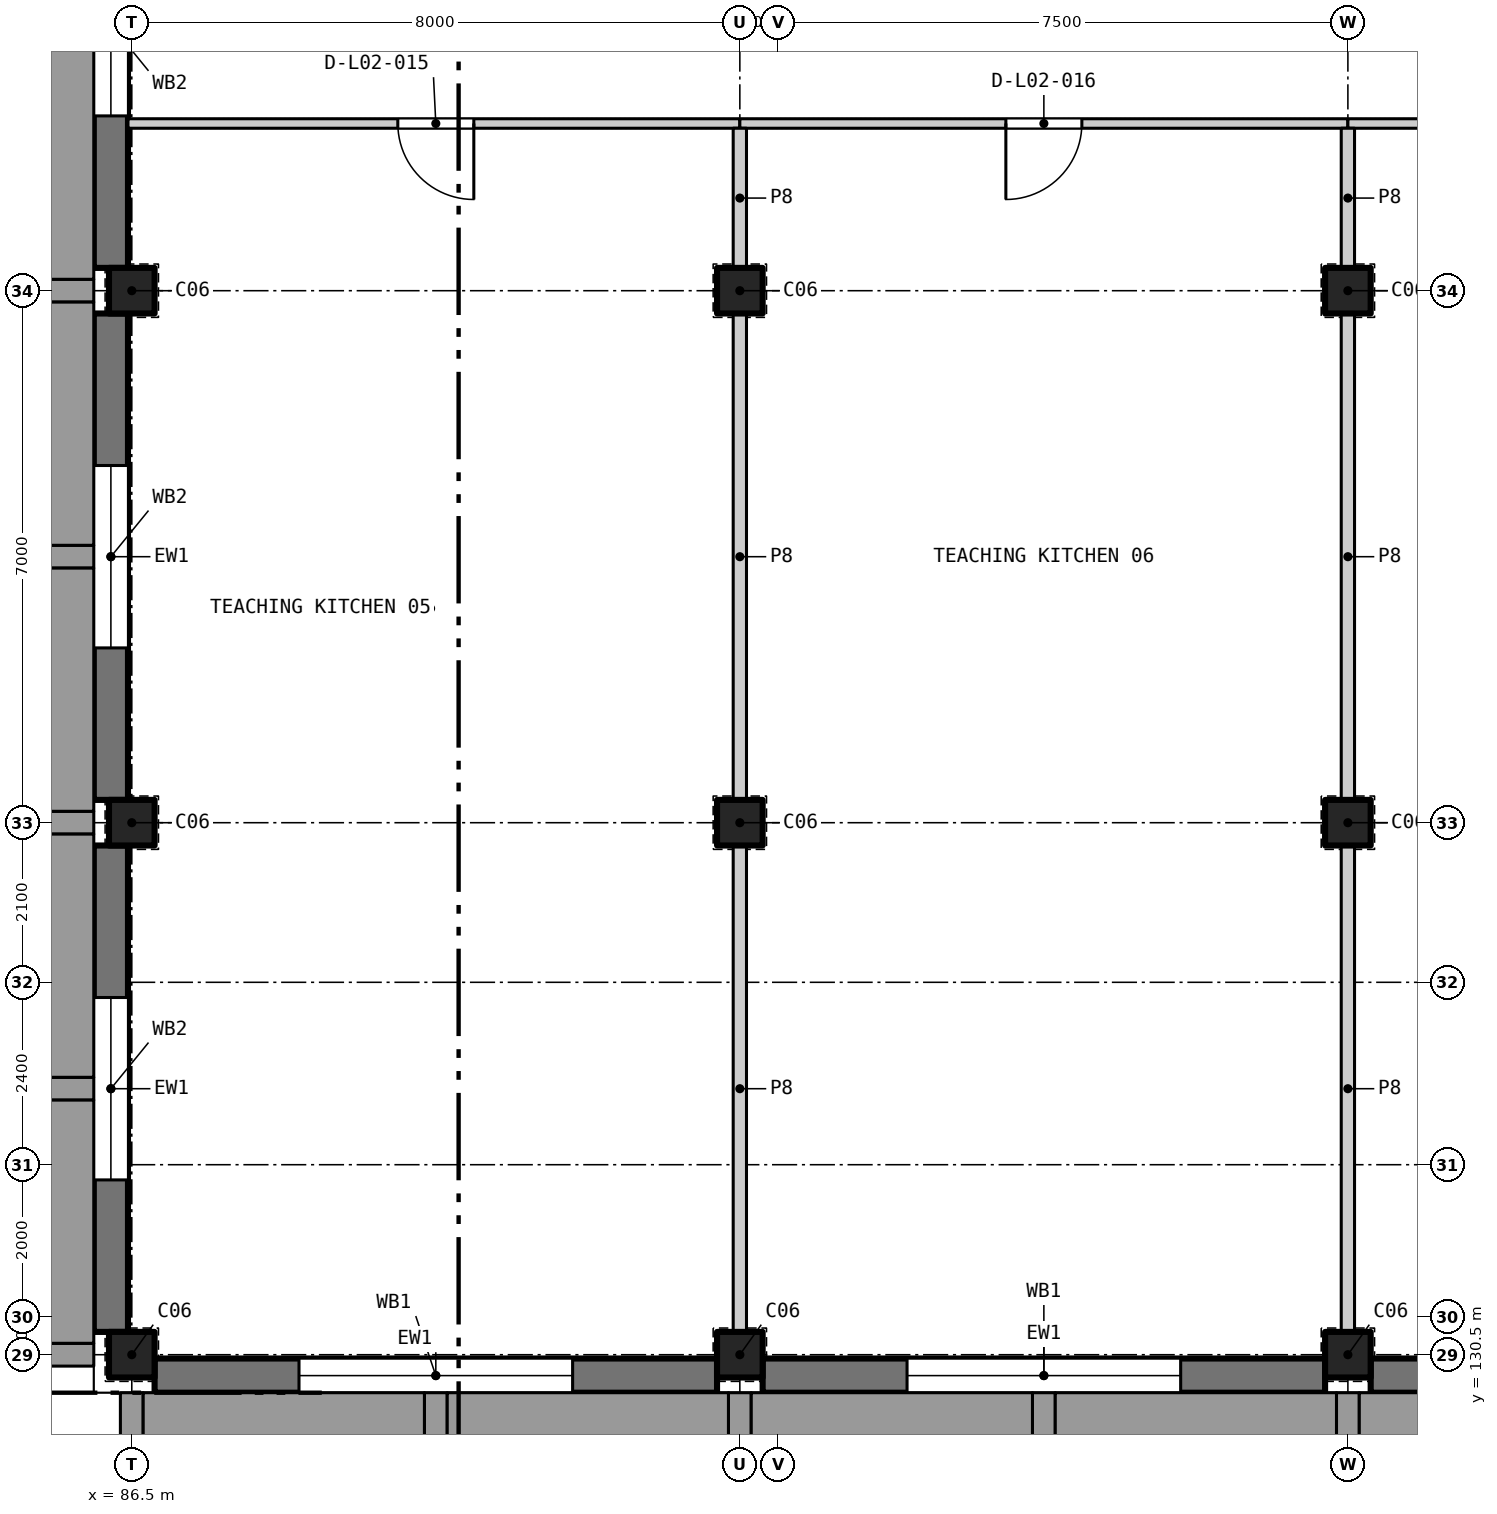
"""IFC4 building model, lengths in metres.
Left out: names, types, materials, properties, quantities, classifications, styles, units other than length and angle.
Written with IfcOpenShell. Run it as: python <this file> out.ifc"""

import sys

from ifc_helpers import new_model, si_unit, direction, frame, frame_2d, origin, origin_2d, place, context, subcontext, project, spatial, rectangle, extrude, element, fill, save


model = new_model("IFC4")
c1 = context("Model", 3, precision=1e-05, world=origin(), true_north=direction((0.0, 1.0)))
c2 = subcontext(c1, "Body", "Model", "MODEL_VIEW")
j1 = project(units=[si_unit("LENGTHUNIT", "METRE"), si_unit("PLANEANGLEUNIT", "RADIAN")], contexts=[c1])
p1 = place(None, origin())
s1 = spatial("IfcSite", under=j1, at=p1, CompositionType="ELEMENT")
p2 = place(p1, origin())
s2 = spatial("IfcBuilding", under=s1, at=p2, CompositionType="ELEMENT")
p3 = place(p2, frame((0.0, 0.0, 10.2)))
s3 = spatial("IfcBuildingStorey", under=s2, at=p3, CompositionType="ELEMENT", Elevation=10.2)
for number, where, z_axis, x_axis in (
    (1, (86.5, 130.5, 0.0), (0.0, 0.0, 1.0), (1.0, 0.0, 0.0)),
    (2, (86.5, 137.5, 0.0), (0.0, 0.0, 1.0), (1.0, 0.0, 0.0)),
    (3, (86.5, 144.5, 0.0), (0.0, 0.0, 1.0), (1.0, 0.0, 0.0)),
    (4, (94.5, 130.5, 0.0), (0.0, 0.0, 1.0), (1.0, 0.0, 0.0)),
    (5, (94.5, 137.5, 0.0), (0.0, 0.0, 1.0), (1.0, 0.0, 0.0)),
    (6, (94.5, 144.5, 0.0), (0.0, 0.0, 1.0), (1.0, 0.0, 0.0)),
    (7, (102.5, 130.5, 0.0), (0.0, 0.0, 1.0), (1.0, 0.0, 0.0)),
    (8, (102.5, 137.5, 0.0), (0.0, 0.0, 1.0), (1.0, 0.0, 0.0)),
    (9, (102.5, 144.5, 0.0), (0.0, 0.0, 1.0), (1.0, 0.0, 0.0)),
):
    element("IfcColumn", number, at=place(p3, frame(where, z_axis=z_axis, x_axis=x_axis)), inside=s3, PredefinedType="COLUMN", context=c2, shape_type="SweptSolid", body=[
        extrude(rectangle(XDim=0.6, YDim=0.6, at=origin_2d()), origin(), (0.0, 0.0, 1.0), 4.2),
    ])
p4 = place(p3, frame((94.2, 130.225, 0.0), z_axis=(0.0, 0.0, 1.0), x_axis=(-1.0, 0.0, 0.0)))
e10 = element("IfcWall", 10, at=p4, inside=s3, PredefinedType="SOLIDWALL", context=c2, shape_type="SweptSolid", body=[
    extrude(rectangle(XDim=7.4, YDim=0.45, at=frame_2d((3.7, 0.0))), origin(), (0.0, 0.0, 1.0), 3.1),
])
p5 = place(p4, frame((1.9, 0.0, 0.9)))
e11 = element("IfcOpeningElement", 11, at=p5, cuts=e10, PredefinedType="OPENING", context=c2, shape_type="SweptSolid", body=[
    extrude(rectangle(XDim=3.6, YDim=1.6, at=frame_2d((1.8, 0.8))), frame((0.0, 0.235, 0.0), z_axis=(0.0, -1.0, 0.0), x_axis=(1.0, 0.0, 0.0)), (0.0, 0.0, 1.0), 0.47),
])
p6 = place(p3, frame((102.2, 130.225, 0.0), z_axis=(0.0, 0.0, 1.0), x_axis=(-1.0, 0.0, 0.0)))
e12 = element("IfcWall", 12, at=p6, inside=s3, PredefinedType="SOLIDWALL", context=c2, shape_type="SweptSolid", body=[
    extrude(rectangle(XDim=7.4, YDim=0.45, at=frame_2d((3.7, 0.0))), origin(), (0.0, 0.0, 1.0), 3.1),
])
p7 = place(p6, frame((1.9, 0.0, 0.9)))
e13 = element("IfcOpeningElement", 13, at=p7, cuts=e12, PredefinedType="OPENING", context=c2, shape_type="SweptSolid", body=[
    extrude(rectangle(XDim=3.6, YDim=1.6, at=frame_2d((1.8, 0.8))), frame((0.0, 0.235, 0.0), z_axis=(0.0, -1.0, 0.0), x_axis=(1.0, 0.0, 0.0)), (0.0, 0.0, 1.0), 0.47),
])
p8 = place(p3, frame((110.2, 130.225, 0.0), z_axis=(0.0, 0.0, 1.0), x_axis=(-1.0, 0.0, 0.0)))
e14 = element("IfcWall", 14, at=p8, inside=s3, PredefinedType="SOLIDWALL", context=c2, shape_type="SweptSolid", body=[
    extrude(rectangle(XDim=7.4, YDim=0.45, at=frame_2d((3.7, 0.0))), origin(), (0.0, 0.0, 1.0), 3.1),
])
p9 = place(p8, frame((1.9, 0.0, 0.9)))
e15 = element("IfcOpeningElement", 15, at=p9, cuts=e14, PredefinedType="OPENING", context=c2, shape_type="SweptSolid", body=[
    extrude(rectangle(XDim=3.6, YDim=1.6, at=frame_2d((1.8, 0.8))), frame((0.0, 0.235, 0.0), z_axis=(0.0, -1.0, 0.0), x_axis=(1.0, 0.0, 0.0)), (0.0, 0.0, 1.0), 0.47),
])
p10 = place(p3, frame((86.225, 130.8, 0.0), z_axis=(0.0, 0.0, 1.0), x_axis=(0.0, 1.0, 0.0)))
e16 = element("IfcWall", 16, at=p10, inside=s3, PredefinedType="SOLIDWALL", context=c2, shape_type="SweptSolid", body=[
    extrude(rectangle(XDim=6.4, YDim=0.45, at=frame_2d((3.2, 0.0))), origin(), (0.0, 0.0, 1.0), 3.2),
])
p11 = place(p10, frame((2.0, 0.0, 0.9)))
e17 = element("IfcOpeningElement", 17, at=p11, cuts=e16, PredefinedType="OPENING", context=c2, shape_type="SweptSolid", body=[
    extrude(rectangle(XDim=2.4, YDim=1.6, at=frame_2d((1.2, 0.8))), frame((0.0, 0.235, 0.0), z_axis=(0.0, -1.0, 0.0), x_axis=(1.0, 0.0, 0.0)), (0.0, 0.0, 1.0), 0.47),
])
p12 = place(p3, frame((86.225, 137.8, 0.0), z_axis=(0.0, 0.0, 1.0), x_axis=(0.0, 1.0, 0.0)))
e18 = element("IfcWall", 18, at=p12, inside=s3, PredefinedType="SOLIDWALL", context=c2, shape_type="SweptSolid", body=[
    extrude(rectangle(XDim=6.4, YDim=0.45, at=frame_2d((3.2, 0.0))), origin(), (0.0, 0.0, 1.0), 3.2),
])
p13 = place(p12, frame((2.0, 0.0, 0.9)))
e19 = element("IfcOpeningElement", 19, at=p13, cuts=e18, PredefinedType="OPENING", context=c2, shape_type="SweptSolid", body=[
    extrude(rectangle(XDim=2.4, YDim=1.6, at=frame_2d((1.2, 0.8))), frame((0.0, 0.235, 0.0), z_axis=(0.0, -1.0, 0.0), x_axis=(1.0, 0.0, 0.0)), (0.0, 0.0, 1.0), 0.47),
])
p14 = place(p3, frame((86.225, 144.8, 0.0), z_axis=(0.0, 0.0, 1.0), x_axis=(0.0, 1.0, 0.0)))
e20 = element("IfcWall", 20, at=p14, inside=s3, PredefinedType="SOLIDWALL", context=c2, shape_type="SweptSolid", body=[
    extrude(rectangle(XDim=6.4, YDim=0.45, at=frame_2d((3.2, 0.0))), origin(), (0.0, 0.0, 1.0), 3.2),
])
p15 = place(p14, frame((2.0, 0.0, 0.9)))
e21 = element("IfcOpeningElement", 21, at=p15, cuts=e20, PredefinedType="OPENING", context=c2, shape_type="SweptSolid", body=[
    extrude(rectangle(XDim=2.4, YDim=1.6, at=frame_2d((1.2, 0.8))), frame((0.0, 0.235, 0.0), z_axis=(0.0, -1.0, 0.0), x_axis=(1.0, 0.0, 0.0)), (0.0, 0.0, 1.0), 0.47),
])
p16 = place(p3, frame((86.45, 146.7, 0.0), z_axis=(0.0, 0.0, 1.0), x_axis=(1.0, 0.0, 0.0)))
e22 = element("IfcWall", 22, at=p16, inside=s3, PredefinedType="PARTITIONING", context=c2, shape_type="SweptSolid", body=[
    extrude(rectangle(XDim=8.05, YDim=0.125, at=frame_2d((4.025, 0.0))), origin(), (0.0, 0.0, 1.0), 3.9),
])
p17 = place(p16, frame((3.55, 0.0, 0.0)))
e23 = element("IfcOpeningElement", 23, at=p17, cuts=e22, PredefinedType="OPENING", context=c2, shape_type="SweptSolid", body=[
    extrude(rectangle(XDim=1.0, YDim=2.1, at=frame_2d((0.5, 1.05))), frame((0.0, 0.073, 0.0), z_axis=(0.0, -1.0, 0.0), x_axis=(1.0, 0.0, 0.0)), (0.0, 0.0, 1.0), 0.145),
])
p18 = place(p3, frame((94.5, 146.7, 0.0), z_axis=(0.0, 0.0, 1.0), x_axis=(1.0, 0.0, 0.0)))
e24 = element("IfcWall", 24, at=p18, inside=s3, PredefinedType="PARTITIONING", context=c2, shape_type="SweptSolid", body=[
    extrude(rectangle(XDim=8.0, YDim=0.125, at=frame_2d((4.0, 0.0))), origin(), (0.0, 0.0, 1.0), 3.9),
])
p19 = place(p18, frame((3.5, 0.0, 0.0)))
e25 = element("IfcOpeningElement", 25, at=p19, cuts=e24, PredefinedType="OPENING", context=c2, shape_type="SweptSolid", body=[
    extrude(rectangle(XDim=1.0, YDim=2.1, at=frame_2d((0.5, 1.05))), frame((0.0, 0.073, 0.0), z_axis=(0.0, -1.0, 0.0), x_axis=(1.0, 0.0, 0.0)), (0.0, 0.0, 1.0), 0.145),
])
p20 = place(p3, frame((102.5, 146.7, 0.0), z_axis=(0.0, 0.0, 1.0), x_axis=(1.0, 0.0, 0.0)))
e26 = element("IfcWall", 26, at=p20, inside=s3, PredefinedType="PARTITIONING", context=c2, shape_type="SweptSolid", body=[
    extrude(rectangle(XDim=16.0, YDim=0.125, at=frame_2d((8.0, 0.0))), origin(), (0.0, 0.0, 1.0), 3.9),
])
p21 = place(p20, frame((1.5, 0.0, 0.0)))
e27 = element("IfcOpeningElement", 27, at=p21, cuts=e26, PredefinedType="OPENING", context=c2, shape_type="SweptSolid", body=[
    extrude(rectangle(XDim=1.8, YDim=2.1, at=frame_2d((0.9, 1.05))), frame((0.0, 0.073, 0.0), z_axis=(0.0, -1.0, 0.0), x_axis=(1.0, 0.0, 0.0)), (0.0, 0.0, 1.0), 0.145),
])
p22 = place(p20, frame((12.7, 0.0, 0.0)))
e28 = element("IfcOpeningElement", 28, at=p22, cuts=e26, PredefinedType="OPENING", context=c2, shape_type="SweptSolid", body=[
    extrude(rectangle(XDim=1.8, YDim=2.1, at=frame_2d((0.9, 1.05))), frame((0.0, 0.073, 0.0), z_axis=(0.0, -1.0, 0.0), x_axis=(1.0, 0.0, 0.0)), (0.0, 0.0, 1.0), 0.145),
])
for number, where, z_axis, x_axis in (
    (29, (94.5, 130.8, 0.0), (0.0, 0.0, 1.0), (0.0, 1.0, 0.0)),
    (30, (94.5, 137.8, 0.0), (0.0, 0.0, 1.0), (0.0, 1.0, 0.0)),
):
    element("IfcWall", number, at=place(p3, frame(where, z_axis=z_axis, x_axis=x_axis)), inside=s3, PredefinedType="PARTITIONING", context=c2, shape_type="SweptSolid", body=[
        extrude(rectangle(XDim=6.4, YDim=0.175, at=frame_2d((3.2, 0.0))), origin(), (0.0, 0.0, 1.0), 3.2),
    ])
p23 = place(p3, frame((94.5, 144.8, 0.0), z_axis=(0.0, 0.0, 1.0), x_axis=(0.0, 1.0, 0.0)))
e31 = element("IfcWall", 31, at=p23, inside=s3, PredefinedType="PARTITIONING", context=c2, shape_type="SweptSolid", body=[
    extrude(rectangle(XDim=1.837, YDim=0.175, at=frame_2d((0.919, 0.0))), origin(), (0.0, 0.0, 1.0), 3.2),
])
for number, where, z_axis, x_axis in (
    (32, (102.5, 130.8, 0.0), (0.0, 0.0, 1.0), (0.0, 1.0, 0.0)),
    (33, (102.5, 137.8, 0.0), (0.0, 0.0, 1.0), (0.0, 1.0, 0.0)),
):
    element("IfcWall", number, at=place(p3, frame(where, z_axis=z_axis, x_axis=x_axis)), inside=s3, PredefinedType="PARTITIONING", context=c2, shape_type="SweptSolid", body=[
        extrude(rectangle(XDim=6.4, YDim=0.175, at=frame_2d((3.2, 0.0))), origin(), (0.0, 0.0, 1.0), 3.2),
    ])
p24 = place(p3, frame((102.5, 144.8, 0.0), z_axis=(0.0, 0.0, 1.0), x_axis=(0.0, 1.0, 0.0)))
e34 = element("IfcWall", 34, at=p24, inside=s3, PredefinedType="PARTITIONING", context=c2, shape_type="SweptSolid", body=[
    extrude(rectangle(XDim=1.837, YDim=0.175, at=frame_2d((0.919, 0.0))), origin(), (0.0, 0.0, 1.0), 3.2),
])
p25 = place(p5, origin())
e35 = element("IfcWindow", 35, at=p25, inside=s3, PartitioningType="SINGLE_PANEL", PredefinedType="WINDOW", context=c2, shape_type="SweptSolid", body=[
    extrude(rectangle(XDim=3.6, YDim=1.6, at=frame_2d((1.8, 0.8))), frame((0.0, -0.125, 0.0), z_axis=(0.0, -1.0, 0.0), x_axis=(1.0, 0.0, 0.0)), (0.0, 0.0, 1.0), 0.06),
])
fill(e11, e35)
p26 = place(p7, origin())
e36 = element("IfcWindow", 36, at=p26, inside=s3, PartitioningType="SINGLE_PANEL", PredefinedType="WINDOW", context=c2, shape_type="SweptSolid", body=[
    extrude(rectangle(XDim=3.6, YDim=1.6, at=frame_2d((1.8, 0.8))), frame((0.0, -0.125, 0.0), z_axis=(0.0, -1.0, 0.0), x_axis=(1.0, 0.0, 0.0)), (0.0, 0.0, 1.0), 0.06),
])
fill(e13, e36)
p27 = place(p11, origin())
e37 = element("IfcWindow", 37, at=p27, inside=s3, PartitioningType="SINGLE_PANEL", PredefinedType="WINDOW", context=c2, shape_type="SweptSolid", body=[
    extrude(rectangle(XDim=2.4, YDim=1.6, at=frame_2d((1.2, 0.8))), frame((0.0, -0.125, 0.0), z_axis=(0.0, -1.0, 0.0), x_axis=(1.0, 0.0, 0.0)), (0.0, 0.0, 1.0), 0.06),
])
fill(e17, e37)
p28 = place(p13, origin())
e38 = element("IfcWindow", 38, at=p28, inside=s3, PartitioningType="SINGLE_PANEL", PredefinedType="WINDOW", context=c2, shape_type="SweptSolid", body=[
    extrude(rectangle(XDim=2.4, YDim=1.6, at=frame_2d((1.2, 0.8))), frame((0.0, -0.125, 0.0), z_axis=(0.0, -1.0, 0.0), x_axis=(1.0, 0.0, 0.0)), (0.0, 0.0, 1.0), 0.06),
])
fill(e19, e38)
p29 = place(p15, origin())
e39 = element("IfcWindow", 39, at=p29, inside=s3, PartitioningType="SINGLE_PANEL", PredefinedType="WINDOW", context=c2, shape_type="SweptSolid", body=[
    extrude(rectangle(XDim=2.4, YDim=1.6, at=frame_2d((1.2, 0.8))), frame((0.0, -0.125, 0.0), z_axis=(0.0, -1.0, 0.0), x_axis=(1.0, 0.0, 0.0)), (0.0, 0.0, 1.0), 0.06),
])
fill(e21, e39)
p30 = place(p17, frame((1.0, 0.0, 0.0), z_axis=(0.0, 0.0, 1.0), x_axis=(-1.0, 0.0, 0.0)))
e40 = element("IfcDoor", 40, at=p30, inside=s3, OperationType="SINGLE_SWING_LEFT", PredefinedType="DOOR", context=c2, shape_type="SweptSolid", body=[
    extrude(rectangle(XDim=1.0, YDim=2.1, at=frame_2d((0.5, 1.05))), frame((0.0, 0.025, 0.0), z_axis=(0.0, -1.0, 0.0), x_axis=(1.0, 0.0, 0.0)), (0.0, 0.0, 1.0), 0.05),
])
fill(e23, e40)
p31 = place(p19, frame((1.0, 0.0, 0.0), z_axis=(0.0, 0.0, 1.0), x_axis=(-1.0, 0.0, 0.0)))
e41 = element("IfcDoor", 41, at=p31, inside=s3, OperationType="SINGLE_SWING_RIGHT", PredefinedType="DOOR", context=c2, shape_type="SweptSolid", body=[
    extrude(rectangle(XDim=1.0, YDim=2.1, at=frame_2d((0.5, 1.05))), frame((0.0, 0.025, 0.0), z_axis=(0.0, -1.0, 0.0), x_axis=(1.0, 0.0, 0.0)), (0.0, 0.0, 1.0), 0.05),
])
fill(e25, e41)
save(model, sys.argv[1])
